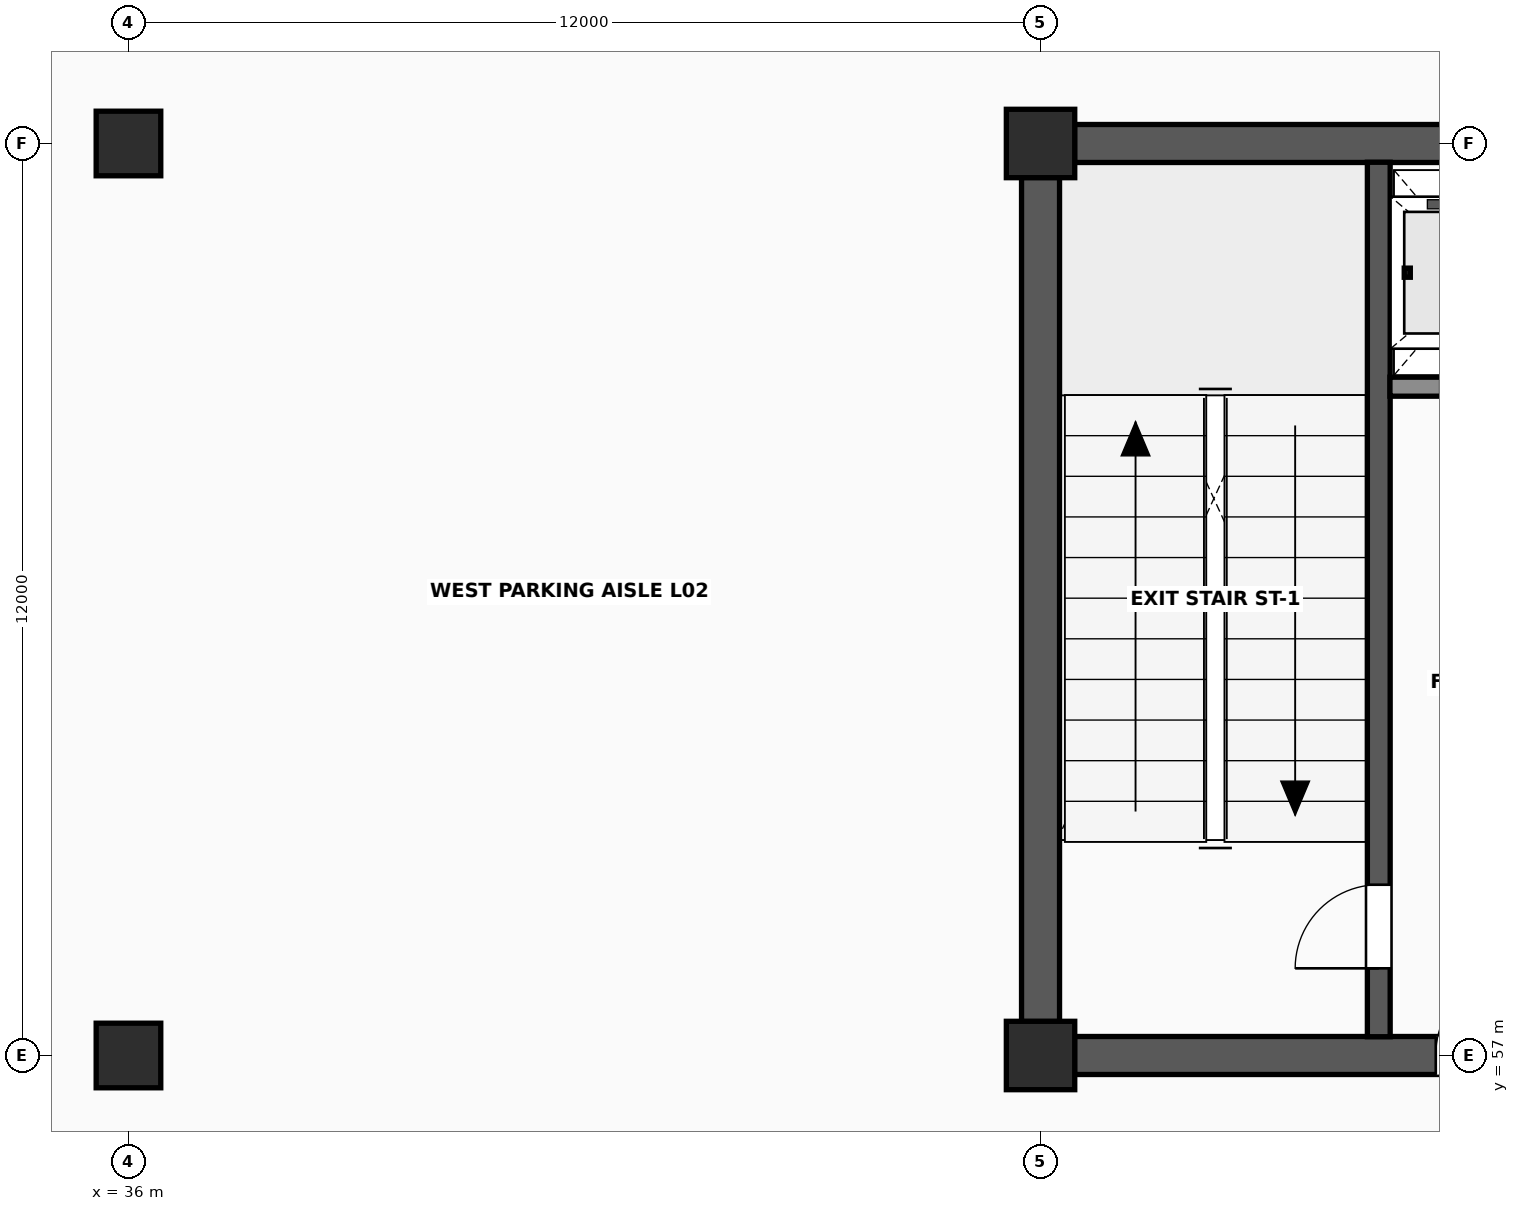
"""IFC4 building model, lengths in metres.
Left out: names, types, materials, properties, quantities, classifications, styles, units other than length and angle.
Written with IfcOpenShell. Run it as: python <this file> out.ifc"""

import sys

from ifc_helpers import new_model, si_unit, direction, frame, frame_2d, origin, origin_2d, place, context, subcontext, project, spatial, rectangle, extrude, element, fill, save


model = new_model("IFC4")
c1 = context("Model", 3, precision=1e-05, world=origin(), true_north=direction((0.0, 1.0)))
c2 = subcontext(c1, "Body", "Model", "MODEL_VIEW")
j1 = project(units=[si_unit("LENGTHUNIT", "METRE"), si_unit("PLANEANGLEUNIT", "RADIAN")], contexts=[c1])
p1 = place(None, origin())
s1 = spatial("IfcSite", under=j1, at=p1, CompositionType="ELEMENT")
p2 = place(p1, origin())
s2 = spatial("IfcBuilding", under=s1, at=p2, CompositionType="ELEMENT")
p3 = place(p2, frame((0.0, 0.0, 9.6)))
s3 = spatial("IfcBuildingStorey", under=s2, at=p3, CompositionType="ELEMENT", Elevation=9.6)
for number, where, z_axis, x_axis in (
    (1, (36.0, 57.0, 0.0), (0.0, 0.0, 1.0), (1.0, 0.0, 0.0)),
    (2, (36.0, 69.0, 0.0), (0.0, 0.0, 1.0), (1.0, 0.0, 0.0)),
):
    element("IfcColumn", number, at=place(p3, frame(where, z_axis=z_axis, x_axis=x_axis)), inside=s3, PredefinedType="COLUMN", context=c2, shape_type="SweptSolid", body=[
        extrude(rectangle(XDim=0.85, YDim=0.85, at=origin_2d()), origin(), (0.0, 0.0, 1.0), 3.8),
    ])
for number, where, z_axis, x_axis in (
    (3, (48.0, 57.0, 0.0), (0.0, 0.0, 1.0), (1.0, 0.0, 0.0)),
    (4, (48.0, 69.0, 0.0), (0.0, 0.0, 1.0), (1.0, 0.0, 0.0)),
):
    element("IfcColumn", number, at=place(p3, frame(where, z_axis=z_axis, x_axis=x_axis)), inside=s3, PredefinedType="COLUMN", context=c2, shape_type="SweptSolid", body=[
        extrude(rectangle(XDim=0.9, YDim=0.9, at=origin_2d()), origin(), (0.0, 0.0, 1.0), 3.8),
    ])
p4 = place(p3, frame((48.447, 57.0, 0.0), z_axis=(0.0, 0.0, 1.0), x_axis=(1.0, 0.0, 0.0)))
e5 = element("IfcWall", 5, at=p4, inside=s3, PredefinedType="SHEAR", context=c2, shape_type="SweptSolid", body=[
    extrude(rectangle(XDim=11.106, YDim=0.5, at=frame_2d((5.553, 0.0))), origin(), (0.0, 0.0, 1.0), 3.638),
])
p5 = place(p4, frame((4.753, 0.0, 0.0)))
e6 = element("IfcOpeningElement", 6, at=p5, cuts=e5, PredefinedType="OPENING", context=c2, shape_type="SweptSolid", body=[
    extrude(rectangle(XDim=1.2, YDim=2.2, at=frame_2d((0.6, 1.1))), frame((0.0, 0.265, 0.0), z_axis=(0.0, -1.0, 0.0), x_axis=(1.0, 0.0, 0.0)), (0.0, 0.0, 1.0), 0.53),
])
p6 = place(p4, frame((8.453, 0.0, 0.0)))
e7 = element("IfcOpeningElement", 7, at=p6, cuts=e5, PredefinedType="OPENING", context=c2, shape_type="SweptSolid", body=[
    extrude(rectangle(XDim=1.5, YDim=2.25, at=frame_2d((0.75, 1.125))), frame((0.0, 0.265, 0.0), z_axis=(0.0, -1.0, 0.0), x_axis=(1.0, 0.0, 0.0)), (0.0, 0.0, 1.0), 0.53),
])
for number, where, z_axis, x_axis in (
    (8, (48.447, 69.0, 0.0), (0.0, 0.0, 1.0), (1.0, 0.0, 0.0)),
    (9, (48.0, 57.447, 0.0), (0.0, 0.0, 1.0), (0.0, 1.0, 0.0)),
):
    element("IfcWall", number, at=place(p3, frame(where, z_axis=z_axis, x_axis=x_axis)), inside=s3, PredefinedType="SHEAR", context=c2, shape_type="SweptSolid", body=[
        extrude(rectangle(XDim=11.106, YDim=0.5, at=frame_2d((5.553, 0.0))), origin(), (0.0, 0.0, 1.0), 3.638),
    ])
p7 = place(p3, frame((52.45, 57.247, 0.0), z_axis=(0.0, 0.0, 1.0), x_axis=(0.0, 1.0, 0.0)))
e10 = element("IfcWall", 10, at=p7, inside=s3, PredefinedType="SHEAR", context=c2, shape_type="SweptSolid", body=[
    extrude(rectangle(XDim=11.506, YDim=0.3, at=frame_2d((5.753, 0.0))), origin(), (0.0, 0.0, 1.0), 3.638),
])
p8 = place(p7, frame((0.9, 0.0, 0.0)))
e11 = element("IfcOpeningElement", 11, at=p8, cuts=e10, PredefinedType="OPENING", context=c2, shape_type="SweptSolid", body=[
    extrude(rectangle(XDim=1.1, YDim=2.2, at=frame_2d((0.55, 1.1))), frame((0.0, 0.165, 0.0), z_axis=(0.0, -1.0, 0.0), x_axis=(1.0, 0.0, 0.0)), (0.0, 0.0, 1.0), 0.33),
])
p9 = place(p3, frame((52.597, 65.8, 0.0), z_axis=(0.0, 0.0, 1.0), x_axis=(1.0, 0.0, 0.0)))
e12 = element("IfcWall", 12, at=p9, inside=s3, PredefinedType="SOLIDWALL", context=c2, shape_type="SweptSolid", body=[
    extrude(rectangle(XDim=7.156, YDim=0.25, at=frame_2d((3.578, 0.0))), origin(), (0.0, 0.0, 1.0), 3.638),
])
p10 = place(p9, frame((0.653, 0.0, 0.0)))
e13 = element("IfcOpeningElement", 13, at=p10, cuts=e12, PredefinedType="OPENING", context=c2, shape_type="SweptSolid", body=[
    extrude(rectangle(XDim=1.1, YDim=2.24, at=frame_2d((0.55, 1.12))), frame((0.0, 0.14, 0.0), z_axis=(0.0, -1.0, 0.0), x_axis=(1.0, 0.0, 0.0)), (0.0, 0.0, 1.0), 0.28),
])
p11 = place(p9, frame((3.153, 0.0, 0.0)))
e14 = element("IfcOpeningElement", 14, at=p11, cuts=e12, PredefinedType="OPENING", context=c2, shape_type="SweptSolid", body=[
    extrude(rectangle(XDim=1.05, YDim=2.2, at=frame_2d((0.525, 1.1))), frame((0.0, 0.14, 0.0), z_axis=(0.0, -1.0, 0.0), x_axis=(1.0, 0.0, 0.0)), (0.0, 0.0, 1.0), 0.28),
])
p12 = place(p9, frame((5.528, 0.0, 0.0)))
e15 = element("IfcOpeningElement", 15, at=p12, cuts=e12, PredefinedType="OPENING", context=c2, shape_type="SweptSolid", body=[
    extrude(rectangle(XDim=1.05, YDim=2.2, at=frame_2d((0.525, 1.1))), frame((0.0, 0.14, 0.0), z_axis=(0.0, -1.0, 0.0), x_axis=(1.0, 0.0, 0.0)), (0.0, 0.0, 1.0), 0.28),
])
p13 = place(p8, origin())
e16 = element("IfcDoor", 16, at=p13, inside=s3, OperationType="SINGLE_SWING_LEFT", PredefinedType="DOOR", context=c2, shape_type="SweptSolid", body=[
    extrude(rectangle(XDim=1.1, YDim=2.2, at=frame_2d((0.55, 1.1))), frame((0.0, 0.025, 0.0), z_axis=(0.0, -1.0, 0.0), x_axis=(1.0, 0.0, 0.0)), (0.0, 0.0, 1.0), 0.05),
])
fill(e11, e16)
p14 = place(p5, origin())
e17 = element("IfcDoor", 17, at=p14, inside=s3, OperationType="SINGLE_SWING_RIGHT", PredefinedType="DOOR", context=c2, shape_type="SweptSolid", body=[
    extrude(rectangle(XDim=1.2, YDim=2.2, at=frame_2d((0.6, 1.1))), frame((0.0, 0.025, 0.0), z_axis=(0.0, -1.0, 0.0), x_axis=(1.0, 0.0, 0.0)), (0.0, 0.0, 1.0), 0.05),
])
fill(e6, e17)
save(model, sys.argv[1])
